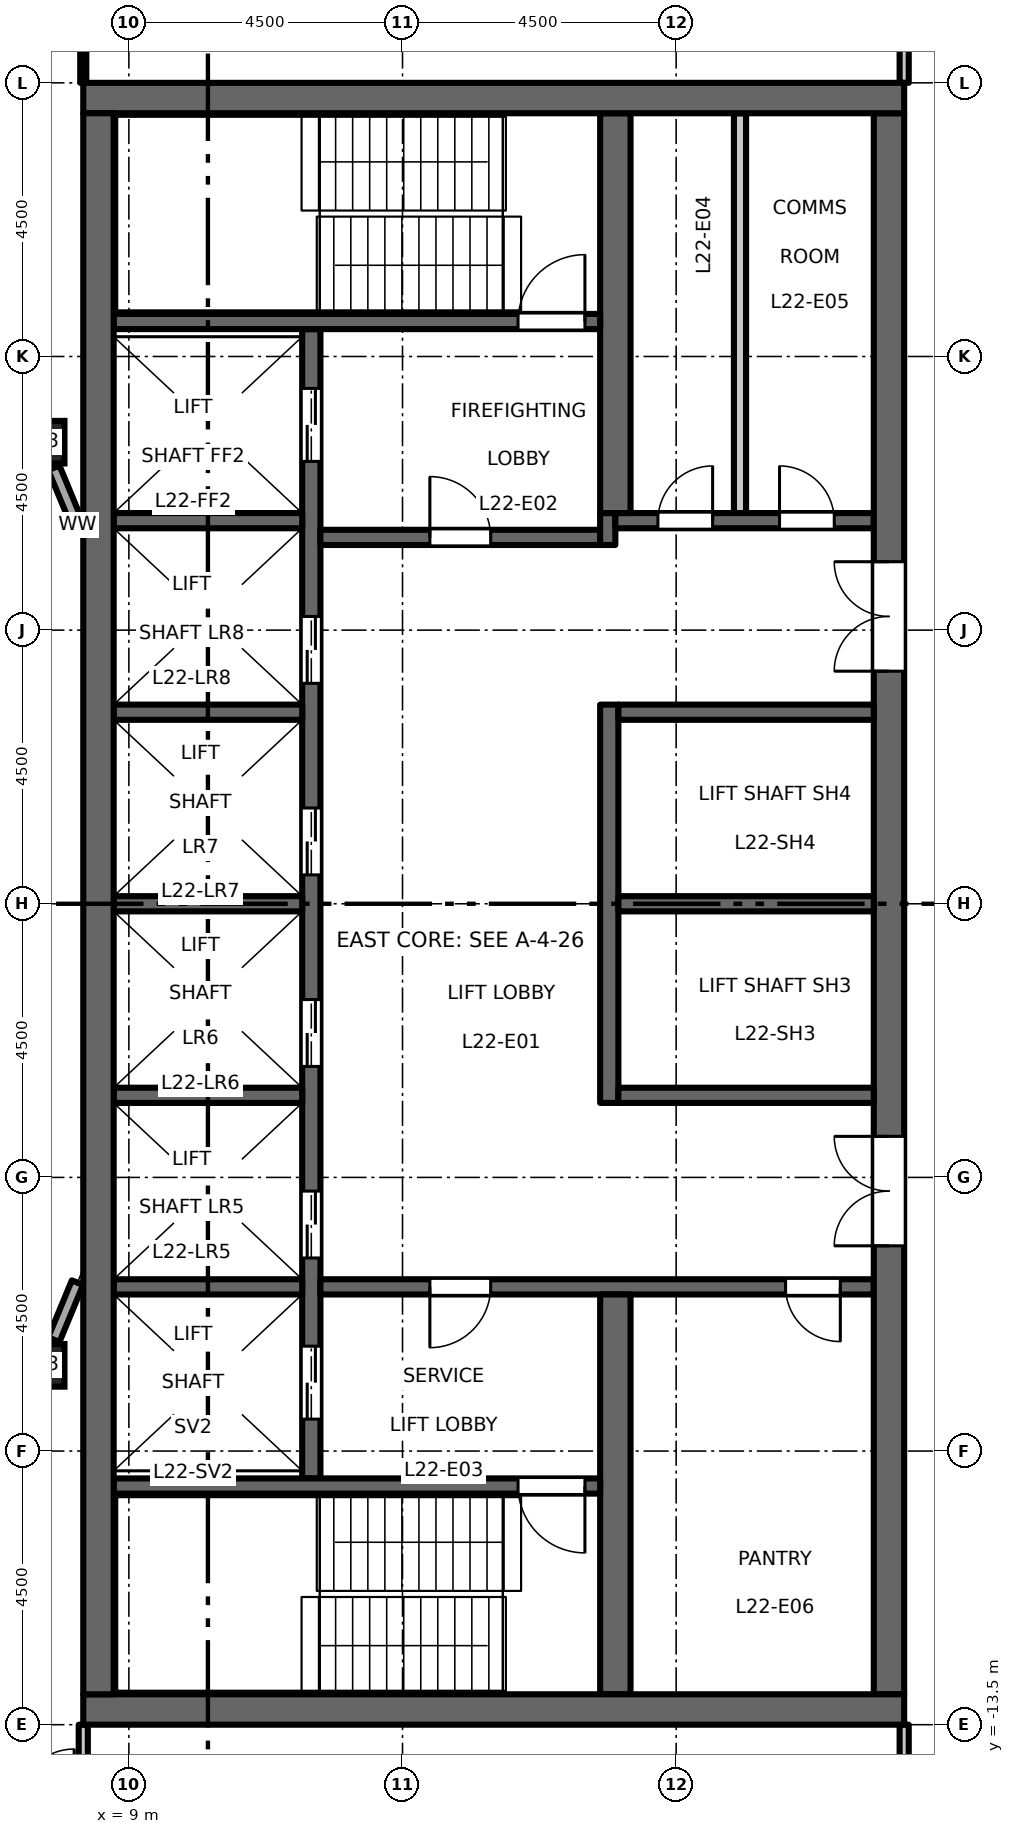
"""IFC4 building model, lengths in metres.
Left out: names, types, materials, properties, quantities, classifications, styles, units other than length and angle.
Written with IfcOpenShell. Run it as: python <this file> out.ifc"""

import sys

from ifc_helpers import new_model, si_unit, direction, frame, frame_2d, origin, origin_2d, place, context, subcontext, project, spatial, rectangle, hollow_rectangle, extrude, element, fill, save


model = new_model("IFC4")
c1 = context("Model", 3, precision=1e-05, world=origin(), true_north=direction((0.0, 1.0)))
c2 = subcontext(c1, "Body", "Model", "MODEL_VIEW")
j1 = project(units=[si_unit("LENGTHUNIT", "METRE"), si_unit("PLANEANGLEUNIT", "RADIAN")], contexts=[c1])
p1 = place(None, origin())
s1 = spatial("IfcSite", under=j1, at=p1, CompositionType="ELEMENT")
p2 = place(p1, origin())
s2 = spatial("IfcBuilding", under=s1, at=p2, CompositionType="ELEMENT")
p3 = place(p2, frame((0.0, 0.0, 104.7)))
s3 = spatial("IfcBuildingStorey", under=s2, at=p3, CompositionType="ELEMENT", Elevation=104.7)
for number, where, z_axis, x_axis in (
    (1, (7.591, -7.591, 0.0), (0.0, 0.0, 1.0), (1.0, 0.0, 0.0)),
    (2, (7.591, 7.591, 0.0), (0.0, 0.0, 1.0), (1.0, 0.0, 0.0)),
):
    element("IfcColumn", number, at=place(p3, frame(where, z_axis=z_axis, x_axis=x_axis)), inside=s3, PredefinedType="COLUMN", context=c2, shape_type="SweptSolid", body=[
        extrude(hollow_rectangle(XDim=0.7, YDim=0.7, WallThickness=0.04, at=origin_2d()), origin(), (0.0, 0.0, 1.0), 4.5),
    ])
p4 = place(p3, frame((12.0, -9.45, 0.0), z_axis=(0.0, 0.0, 1.0), x_axis=(0.0, 1.0, 0.0)))
e3 = element("IfcWall", 3, at=p4, inside=s3, PredefinedType="SHEAR", context=c2, shape_type="SweptSolid", body=[
    extrude(rectangle(XDim=18.9, YDim=0.3, at=frame_2d((9.45, 0.0))), origin(), (0.0, 0.0, 1.0), 4.35),
])
p5 = place(p4, frame((3.625, 0.0, 0.0)))
e4 = element("IfcOpeningElement", 4, at=p5, cuts=e3, PredefinedType="OPENING", context=c2, shape_type="SweptSolid", body=[
    extrude(rectangle(XDim=1.1, YDim=2.1, at=frame_2d((0.55, 1.05))), frame((0.0, 0.16, 0.0), z_axis=(0.0, -1.0, 0.0), x_axis=(1.0, 0.0, 0.0)), (0.0, 0.0, 1.0), 0.32),
])
p6 = place(p4, frame((6.775, 0.0, 0.0)))
e5 = element("IfcOpeningElement", 5, at=p6, cuts=e3, PredefinedType="OPENING", context=c2, shape_type="SweptSolid", body=[
    extrude(rectangle(XDim=1.1, YDim=2.1, at=frame_2d((0.55, 1.05))), frame((0.0, 0.16, 0.0), z_axis=(0.0, -1.0, 0.0), x_axis=(1.0, 0.0, 0.0)), (0.0, 0.0, 1.0), 0.32),
])
p7 = place(p4, frame((9.925, 0.0, 0.0)))
e6 = element("IfcOpeningElement", 6, at=p7, cuts=e3, PredefinedType="OPENING", context=c2, shape_type="SweptSolid", body=[
    extrude(rectangle(XDim=1.1, YDim=2.1, at=frame_2d((0.55, 1.05))), frame((0.0, 0.16, 0.0), z_axis=(0.0, -1.0, 0.0), x_axis=(1.0, 0.0, 0.0)), (0.0, 0.0, 1.0), 0.32),
])
p8 = place(p4, frame((13.075, 0.0, 0.0)))
e7 = element("IfcOpeningElement", 7, at=p8, cuts=e3, PredefinedType="OPENING", context=c2, shape_type="SweptSolid", body=[
    extrude(rectangle(XDim=1.1, YDim=2.1, at=frame_2d((0.55, 1.05))), frame((0.0, 0.16, 0.0), z_axis=(0.0, -1.0, 0.0), x_axis=(1.0, 0.0, 0.0)), (0.0, 0.0, 1.0), 0.32),
])
p9 = place(p4, frame((16.725, 0.0, 0.0)))
e8 = element("IfcOpeningElement", 8, at=p9, cuts=e3, PredefinedType="OPENING", context=c2, shape_type="SweptSolid", body=[
    extrude(rectangle(XDim=1.2, YDim=2.1, at=frame_2d((0.6, 1.05))), frame((0.0, 0.16, 0.0), z_axis=(0.0, -1.0, 0.0), x_axis=(1.0, 0.0, 0.0)), (0.0, 0.0, 1.0), 0.32),
])
p10 = place(p4, frame((0.975, 0.0, 0.0)))
e9 = element("IfcOpeningElement", 9, at=p10, cuts=e3, PredefinedType="OPENING", context=c2, shape_type="SweptSolid", body=[
    extrude(rectangle(XDim=1.2, YDim=2.1, at=frame_2d((0.6, 1.05))), frame((0.0, 0.16, 0.0), z_axis=(0.0, -1.0, 0.0), x_axis=(1.0, 0.0, 0.0)), (0.0, 0.0, 1.0), 0.32),
])
p11 = place(p3, frame((12.15, 6.025, 0.0), z_axis=(0.0, 0.0, 1.0), x_axis=(1.0, 0.0, 0.0)))
e10 = element("IfcWall", 10, at=p11, inside=s3, PredefinedType="SHEAR", context=c2, shape_type="SweptSolid", body=[
    extrude(rectangle(XDim=4.6, YDim=0.25, at=frame_2d((2.3, 0.0))), origin(), (0.0, 0.0, 1.0), 4.35),
])
p12 = place(p11, frame((1.8, 0.0, 0.0)))
e11 = element("IfcOpeningElement", 11, at=p12, cuts=e10, PredefinedType="OPENING", context=c2, shape_type="SweptSolid", body=[
    extrude(rectangle(XDim=1.0, YDim=2.1, at=frame_2d((0.5, 1.05))), frame((0.0, 0.135, 0.0), z_axis=(0.0, -1.0, 0.0), x_axis=(1.0, 0.0, 0.0)), (0.0, 0.0, 1.0), 0.27),
])
p13 = place(p3, frame((16.875, 5.9, 0.0), z_axis=(0.0, 0.0, 1.0), x_axis=(0.0, 1.0, 0.0)))
e12 = element("IfcWall", 12, at=p13, inside=s3, PredefinedType="SHEAR", context=c2, shape_type="SweptSolid", body=[
    extrude(rectangle(XDim=0.525, YDim=0.25, at=frame_2d((0.263, 0.0))), origin(), (0.0, 0.0, 1.0), 4.35),
])
p14 = place(p3, frame((17.0, 6.3, 0.0), z_axis=(0.0, 0.0, 1.0), x_axis=(1.0, 0.0, 0.0)))
e13 = element("IfcWall", 13, at=p14, inside=s3, PredefinedType="SHEAR", context=c2, shape_type="SweptSolid", body=[
    extrude(rectangle(XDim=4.25, YDim=0.25, at=frame_2d((2.125, 0.0))), origin(), (0.0, 0.0, 1.0), 4.35),
])
p15 = place(p14, frame((0.7, 0.0, 0.0)))
e14 = element("IfcOpeningElement", 14, at=p15, cuts=e13, PredefinedType="OPENING", context=c2, shape_type="SweptSolid", body=[
    extrude(rectangle(XDim=0.9, YDim=2.1, at=frame_2d((0.45, 1.05))), frame((0.0, 0.135, 0.0), z_axis=(0.0, -1.0, 0.0), x_axis=(1.0, 0.0, 0.0)), (0.0, 0.0, 1.0), 0.27),
])
p16 = place(p14, frame((2.7, 0.0, 0.0)))
e15 = element("IfcOpeningElement", 15, at=p16, cuts=e13, PredefinedType="OPENING", context=c2, shape_type="SweptSolid", body=[
    extrude(rectangle(XDim=0.9, YDim=2.1, at=frame_2d((0.45, 1.05))), frame((0.0, 0.135, 0.0), z_axis=(0.0, -1.0, 0.0), x_axis=(1.0, 0.0, 0.0)), (0.0, 0.0, 1.0), 0.27),
])
p17 = place(p3, frame((12.15, -6.3, 0.0), z_axis=(0.0, 0.0, 1.0), x_axis=(1.0, 0.0, 0.0)))
e16 = element("IfcWall", 16, at=p17, inside=s3, PredefinedType="SHEAR", context=c2, shape_type="SweptSolid", body=[
    extrude(rectangle(XDim=9.1, YDim=0.25, at=frame_2d((4.55, 0.0))), origin(), (0.0, 0.0, 1.0), 4.35),
])
p18 = place(p17, frame((1.8, 0.0, 0.0)))
e17 = element("IfcOpeningElement", 17, at=p18, cuts=e16, PredefinedType="OPENING", context=c2, shape_type="SweptSolid", body=[
    extrude(rectangle(XDim=1.0, YDim=2.1, at=frame_2d((0.5, 1.05))), frame((0.0, 0.135, 0.0), z_axis=(0.0, -1.0, 0.0), x_axis=(1.0, 0.0, 0.0)), (0.0, 0.0, 1.0), 0.27),
])
p19 = place(p17, frame((7.65, 0.0, 0.0)))
e18 = element("IfcOpeningElement", 18, at=p19, cuts=e16, PredefinedType="OPENING", context=c2, shape_type="SweptSolid", body=[
    extrude(rectangle(XDim=0.9, YDim=2.1, at=frame_2d((0.45, 1.05))), frame((0.0, 0.135, 0.0), z_axis=(0.0, -1.0, 0.0), x_axis=(1.0, 0.0, 0.0)), (0.0, 0.0, 1.0), 0.27),
])
p20 = place(p3, frame((21.5, -13.0, 0.0), z_axis=(0.0, 0.0, 1.0), x_axis=(0.0, 1.0, 0.0)))
e19 = element("IfcWall", 19, at=p20, inside=s3, PredefinedType="SHEAR", context=c2, shape_type="SweptSolid", body=[
    extrude(rectangle(XDim=26.0, YDim=0.5, at=frame_2d((13.0, 0.0))), origin(), (0.0, 0.0, 1.0), 4.35),
])
p21 = place(p20, frame((16.825, 0.0, 0.0)))
e20 = element("IfcOpeningElement", 20, at=p21, cuts=e19, PredefinedType="OPENING", context=c2, shape_type="SweptSolid", body=[
    extrude(rectangle(XDim=1.8, YDim=2.1, at=frame_2d((0.9, 1.05))), frame((0.0, 0.26, 0.0), z_axis=(0.0, -1.0, 0.0), x_axis=(1.0, 0.0, 0.0)), (0.0, 0.0, 1.0), 0.52),
])
p22 = place(p20, frame((7.375, 0.0, 0.0)))
e21 = element("IfcOpeningElement", 21, at=p22, cuts=e19, PredefinedType="OPENING", context=c2, shape_type="SweptSolid", body=[
    extrude(rectangle(XDim=1.8, YDim=2.1, at=frame_2d((0.9, 1.05))), frame((0.0, 0.26, 0.0), z_axis=(0.0, -1.0, 0.0), x_axis=(1.0, 0.0, 0.0)), (0.0, 0.0, 1.0), 0.52),
])
p23 = place(p3, frame((19.05, 6.425, 0.0), z_axis=(0.0, 0.0, 1.0), x_axis=(0.0, 1.0, 0.0)))
e22 = element("IfcWall", 22, at=p23, inside=s3, PredefinedType="PARTITIONING", context=c2, shape_type="SweptSolid", body=[
    extrude(rectangle(XDim=6.575, YDim=0.2, at=frame_2d((3.288, 0.0))), origin(), (0.0, 0.0, 1.0), 4.35),
])
p24 = place(p3, frame((16.9, -3.275, 0.0), z_axis=(0.0, 0.0, 1.0), x_axis=(0.0, 1.0, 0.0)))
e23 = element("IfcWall", 23, at=p24, inside=s3, PredefinedType="SHEAR", context=c2, shape_type="SweptSolid", body=[
    extrude(rectangle(XDim=6.55, YDim=0.3, at=frame_2d((3.275, 0.0))), origin(), (0.0, 0.0, 1.0), 4.35),
])
for number, where, z_axis, x_axis in (
    (24, (17.05, 0.0, 0.0), (0.0, 0.0, 1.0), (1.0, 0.0, 0.0)),
    (25, (17.05, 3.15, 0.0), (0.0, 0.0, 1.0), (1.0, 0.0, 0.0)),
    (26, (17.05, -3.15, 0.0), (0.0, 0.0, 1.0), (1.0, 0.0, 0.0)),
):
    element("IfcWall", number, at=place(p3, frame(where, z_axis=z_axis, x_axis=x_axis)), inside=s3, PredefinedType="SHEAR", context=c2, shape_type="SweptSolid", body=[
        extrude(rectangle(XDim=4.2, YDim=0.25, at=frame_2d((2.1, 0.0))), origin(), (0.0, 0.0, 1.0), 4.35),
    ])
for number, where, z_axis, x_axis in (
    (27, (17.0, 6.425, 0.0), (0.0, 0.0, 1.0), (0.0, 1.0, 0.0)),
    (28, (17.0, -13.0, 0.0), (0.0, 0.0, 1.0), (0.0, 1.0, 0.0)),
):
    element("IfcWall", number, at=place(p3, frame(where, z_axis=z_axis, x_axis=x_axis)), inside=s3, PredefinedType="SHEAR", context=c2, shape_type="SweptSolid", body=[
        extrude(rectangle(XDim=6.575, YDim=0.5, at=frame_2d((3.288, 0.0))), origin(), (0.0, 0.0, 1.0), 4.35),
    ])
for number, where, z_axis, x_axis in (
    (29, (8.75, 0.0, 0.0), (0.0, 0.0, 1.0), (1.0, 0.0, 0.0)),
    (30, (8.75, 3.15, 0.0), (0.0, 0.0, 1.0), (1.0, 0.0, 0.0)),
    (31, (8.75, 6.3, 0.0), (0.0, 0.0, 1.0), (1.0, 0.0, 0.0)),
    (32, (8.75, -3.15, 0.0), (0.0, 0.0, 1.0), (1.0, 0.0, 0.0)),
    (33, (8.75, -6.3, 0.0), (0.0, 0.0, 1.0), (1.0, 0.0, 0.0)),
):
    element("IfcWall", number, at=place(p3, frame(where, z_axis=z_axis, x_axis=x_axis)), inside=s3, PredefinedType="SHEAR", context=c2, shape_type="SweptSolid", body=[
        extrude(rectangle(XDim=3.1, YDim=0.25, at=frame_2d((1.55, 0.0))), origin(), (0.0, 0.0, 1.0), 4.35),
    ])
p25 = place(p3, frame((8.75, 9.575, 0.0), z_axis=(0.0, 0.0, 1.0), x_axis=(1.0, 0.0, 0.0)))
e34 = element("IfcWall", 34, at=p25, inside=s3, PredefinedType="SHEAR", context=c2, shape_type="SweptSolid", body=[
    extrude(rectangle(XDim=8.0, YDim=0.25, at=frame_2d((4.0, 0.0))), origin(), (0.0, 0.0, 1.0), 4.35),
])
p26 = place(p25, frame((6.65, 0.0, 0.0)))
e35 = element("IfcOpeningElement", 35, at=p26, cuts=e34, PredefinedType="OPENING", context=c2, shape_type="SweptSolid", body=[
    extrude(rectangle(XDim=1.1, YDim=2.1, at=frame_2d((0.55, 1.05))), frame((0.0, 0.135, 0.0), z_axis=(0.0, -1.0, 0.0), x_axis=(1.0, 0.0, 0.0)), (0.0, 0.0, 1.0), 0.27),
])
p27 = place(p3, frame((8.75, -9.575, 0.0), z_axis=(0.0, 0.0, 1.0), x_axis=(1.0, 0.0, 0.0)))
e36 = element("IfcWall", 36, at=p27, inside=s3, PredefinedType="SHEAR", context=c2, shape_type="SweptSolid", body=[
    extrude(rectangle(XDim=8.0, YDim=0.25, at=frame_2d((4.0, 0.0))), origin(), (0.0, 0.0, 1.0), 4.35),
])
p28 = place(p27, frame((6.65, 0.0, 0.0)))
e37 = element("IfcOpeningElement", 37, at=p28, cuts=e36, PredefinedType="OPENING", context=c2, shape_type="SweptSolid", body=[
    extrude(rectangle(XDim=1.1, YDim=2.1, at=frame_2d((0.55, 1.05))), frame((0.0, 0.135, 0.0), z_axis=(0.0, -1.0, 0.0), x_axis=(1.0, 0.0, 0.0)), (0.0, 0.0, 1.0), 0.27),
])
for number, where, z_axis, x_axis in (
    (38, (8.25, 13.25, 0.0), (0.0, 0.0, 1.0), (1.0, 0.0, 0.0)),
    (39, (8.25, -13.25, 0.0), (0.0, 0.0, 1.0), (1.0, 0.0, 0.0)),
):
    element("IfcWall", number, at=place(p3, frame(where, z_axis=z_axis, x_axis=x_axis)), inside=s3, PredefinedType="SHEAR", context=c2, shape_type="SweptSolid", body=[
        extrude(rectangle(XDim=13.5, YDim=0.5, at=frame_2d((6.75, 0.0))), origin(), (0.0, 0.0, 1.0), 4.35),
    ])
p29 = place(p3, frame((8.5, -13.0, 0.0), z_axis=(0.0, 0.0, 1.0), x_axis=(0.0, 1.0, 0.0)))
e40 = element("IfcWall", 40, at=p29, inside=s3, PredefinedType="SHEAR", context=c2, shape_type="SweptSolid", body=[
    extrude(rectangle(XDim=26.0, YDim=0.5, at=frame_2d((13.0, 0.0))), origin(), (0.0, 0.0, 1.0), 4.35),
])
for number, where, z_axis, x_axis in (
    (41, (7.766, -7.168, 0.0), (0.0, 0.0, 1.0), (0.383, 0.924, 0.0)),
    (42, (8.154, 6.231, 0.0), (0.0, 0.0, 1.0), (-0.383, 0.924, 0.0)),
):
    element("IfcWall", number, at=place(p3, frame(where, z_axis=z_axis, x_axis=x_axis)), inside=s3, PredefinedType="STANDARD", context=c2, shape_type="SweptSolid", body=[
        extrude(rectangle(XDim=1.015, YDim=0.2, at=frame_2d((0.507, 0.0))), origin(), (0.0, 0.0, 1.0), 3.826),
    ])
p30 = place(p3, frame((8.25, 13.5, 0.0), z_axis=(0.0, 0.0, 1.0), x_axis=(0.0, 1.0, 0.0)))
e43 = element("IfcWall", 43, at=p30, inside=s3, PredefinedType="PARTITIONING", context=c2, shape_type="SweptSolid", body=[
    extrude(rectangle(XDim=3.425, YDim=0.1, at=frame_2d((1.712, 0.0))), origin(), (0.0, 0.0, 1.0), 4.35),
])
p31 = place(p3, frame((8.25, -14.8, 0.0), z_axis=(0.0, 0.0, 1.0), x_axis=(0.0, 1.0, 0.0)))
e44 = element("IfcWall", 44, at=p31, inside=s3, PredefinedType="PARTITIONING", context=c2, shape_type="SweptSolid", body=[
    extrude(rectangle(XDim=1.3, YDim=0.15, at=frame_2d((0.65, 0.0))), origin(), (0.0, 0.0, 1.0), 4.35),
])
for number, where, z_axis, x_axis in (
    (45, (21.75, -16.925, 0.0), (0.0, 0.0, 1.0), (0.0, 1.0, 0.0)),
    (46, (21.75, 13.5, 0.0), (0.0, 0.0, 1.0), (0.0, 1.0, 0.0)),
):
    element("IfcWall", number, at=place(p3, frame(where, z_axis=z_axis, x_axis=x_axis)), inside=s3, PredefinedType="PARTITIONING", context=c2, shape_type="SweptSolid", body=[
        extrude(rectangle(XDim=3.425, YDim=0.15, at=frame_2d((1.712, 0.0))), origin(), (0.0, 0.0, 1.0), 4.35),
    ])
p32 = place(p12, origin())
e47 = element("IfcDoor", 47, at=p32, inside=s3, OperationType="SINGLE_SWING_RIGHT", PredefinedType="DOOR", context=c2, shape_type="SweptSolid", body=[
    extrude(rectangle(XDim=1.0, YDim=2.1, at=frame_2d((0.5, 1.05))), frame((0.0, 0.025, 0.0), z_axis=(0.0, -1.0, 0.0), x_axis=(1.0, 0.0, 0.0)), (0.0, 0.0, 1.0), 0.05),
])
fill(e11, e47)
p33 = place(p18, origin())
e48 = element("IfcDoor", 48, at=p33, inside=s3, OperationType="SINGLE_SWING_LEFT", PredefinedType="DOOR", context=c2, shape_type="SweptSolid", body=[
    extrude(rectangle(XDim=1.0, YDim=2.1, at=frame_2d((0.5, 1.05))), frame((0.0, 0.025, 0.0), z_axis=(0.0, -1.0, 0.0), x_axis=(1.0, 0.0, 0.0)), (0.0, 0.0, 1.0), 0.05),
])
fill(e17, e48)
p34 = place(p26, origin())
e49 = element("IfcDoor", 49, at=p34, inside=s3, OperationType="SINGLE_SWING_LEFT", PredefinedType="DOOR", context=c2, shape_type="SweptSolid", body=[
    extrude(rectangle(XDim=1.1, YDim=2.1, at=frame_2d((0.55, 1.05))), frame((0.0, 0.025, 0.0), z_axis=(0.0, -1.0, 0.0), x_axis=(1.0, 0.0, 0.0)), (0.0, 0.0, 1.0), 0.05),
])
fill(e35, e49)
p35 = place(p28, origin())
e50 = element("IfcDoor", 50, at=p35, inside=s3, OperationType="SINGLE_SWING_RIGHT", PredefinedType="DOOR", context=c2, shape_type="SweptSolid", body=[
    extrude(rectangle(XDim=1.1, YDim=2.1, at=frame_2d((0.55, 1.05))), frame((0.0, 0.025, 0.0), z_axis=(0.0, -1.0, 0.0), x_axis=(1.0, 0.0, 0.0)), (0.0, 0.0, 1.0), 0.05),
])
fill(e37, e50)
p36 = place(p21, origin())
e51 = element("IfcDoor", 51, at=p36, inside=s3, OperationType="DOUBLE_DOOR_DOUBLE_SWING", PredefinedType="DOOR", context=c2, shape_type="SweptSolid", body=[
    extrude(rectangle(XDim=1.8, YDim=2.1, at=frame_2d((0.9, 1.05))), frame((0.0, 0.025, 0.0), z_axis=(0.0, -1.0, 0.0), x_axis=(1.0, 0.0, 0.0)), (0.0, 0.0, 1.0), 0.05),
])
fill(e20, e51)
p37 = place(p22, origin())
e52 = element("IfcDoor", 52, at=p37, inside=s3, OperationType="DOUBLE_DOOR_DOUBLE_SWING", PredefinedType="DOOR", context=c2, shape_type="SweptSolid", body=[
    extrude(rectangle(XDim=1.8, YDim=2.1, at=frame_2d((0.9, 1.05))), frame((0.0, 0.025, 0.0), z_axis=(0.0, -1.0, 0.0), x_axis=(1.0, 0.0, 0.0)), (0.0, 0.0, 1.0), 0.05),
])
fill(e21, e52)
p38 = place(p5, origin())
e53 = element("IfcDoor", 53, at=p38, inside=s3, OperationType="DOUBLE_DOOR_SLIDING", PredefinedType="DOOR", context=c2, shape_type="SweptSolid", body=[
    extrude(rectangle(XDim=1.1, YDim=2.1, at=frame_2d((0.55, 1.05))), frame((0.0, 0.025, 0.0), z_axis=(0.0, -1.0, 0.0), x_axis=(1.0, 0.0, 0.0)), (0.0, 0.0, 1.0), 0.05),
])
fill(e4, e53)
p39 = place(p6, origin())
e54 = element("IfcDoor", 54, at=p39, inside=s3, OperationType="DOUBLE_DOOR_SLIDING", PredefinedType="DOOR", context=c2, shape_type="SweptSolid", body=[
    extrude(rectangle(XDim=1.1, YDim=2.1, at=frame_2d((0.55, 1.05))), frame((0.0, 0.025, 0.0), z_axis=(0.0, -1.0, 0.0), x_axis=(1.0, 0.0, 0.0)), (0.0, 0.0, 1.0), 0.05),
])
fill(e5, e54)
p40 = place(p7, origin())
e55 = element("IfcDoor", 55, at=p40, inside=s3, OperationType="DOUBLE_DOOR_SLIDING", PredefinedType="DOOR", context=c2, shape_type="SweptSolid", body=[
    extrude(rectangle(XDim=1.1, YDim=2.1, at=frame_2d((0.55, 1.05))), frame((0.0, 0.025, 0.0), z_axis=(0.0, -1.0, 0.0), x_axis=(1.0, 0.0, 0.0)), (0.0, 0.0, 1.0), 0.05),
])
fill(e6, e55)
p41 = place(p8, origin())
e56 = element("IfcDoor", 56, at=p41, inside=s3, OperationType="DOUBLE_DOOR_SLIDING", PredefinedType="DOOR", context=c2, shape_type="SweptSolid", body=[
    extrude(rectangle(XDim=1.1, YDim=2.1, at=frame_2d((0.55, 1.05))), frame((0.0, 0.025, 0.0), z_axis=(0.0, -1.0, 0.0), x_axis=(1.0, 0.0, 0.0)), (0.0, 0.0, 1.0), 0.05),
])
fill(e7, e56)
p42 = place(p9, origin())
e57 = element("IfcDoor", 57, at=p42, inside=s3, OperationType="DOUBLE_DOOR_SLIDING", PredefinedType="DOOR", context=c2, shape_type="SweptSolid", body=[
    extrude(rectangle(XDim=1.2, YDim=2.1, at=frame_2d((0.6, 1.05))), frame((0.0, 0.025, 0.0), z_axis=(0.0, -1.0, 0.0), x_axis=(1.0, 0.0, 0.0)), (0.0, 0.0, 1.0), 0.05),
])
fill(e8, e57)
p43 = place(p10, origin())
e58 = element("IfcDoor", 58, at=p43, inside=s3, OperationType="DOUBLE_DOOR_SLIDING", PredefinedType="DOOR", context=c2, shape_type="SweptSolid", body=[
    extrude(rectangle(XDim=1.2, YDim=2.1, at=frame_2d((0.6, 1.05))), frame((0.0, 0.025, 0.0), z_axis=(0.0, -1.0, 0.0), x_axis=(1.0, 0.0, 0.0)), (0.0, 0.0, 1.0), 0.05),
])
fill(e9, e58)
p44 = place(p15, origin())
e59 = element("IfcDoor", 59, at=p44, inside=s3, OperationType="SINGLE_SWING_LEFT", PredefinedType="DOOR", context=c2, shape_type="SweptSolid", body=[
    extrude(rectangle(XDim=0.9, YDim=2.1, at=frame_2d((0.45, 1.05))), frame((0.0, 0.025, 0.0), z_axis=(0.0, -1.0, 0.0), x_axis=(1.0, 0.0, 0.0)), (0.0, 0.0, 1.0), 0.05),
])
fill(e14, e59)
p45 = place(p16, origin())
e60 = element("IfcDoor", 60, at=p45, inside=s3, OperationType="SINGLE_SWING_RIGHT", PredefinedType="DOOR", context=c2, shape_type="SweptSolid", body=[
    extrude(rectangle(XDim=0.9, YDim=2.1, at=frame_2d((0.45, 1.05))), frame((0.0, 0.025, 0.0), z_axis=(0.0, -1.0, 0.0), x_axis=(1.0, 0.0, 0.0)), (0.0, 0.0, 1.0), 0.05),
])
fill(e15, e60)
p46 = place(p19, origin())
e61 = element("IfcDoor", 61, at=p46, inside=s3, OperationType="SINGLE_SWING_RIGHT", PredefinedType="DOOR", context=c2, shape_type="SweptSolid", body=[
    extrude(rectangle(XDim=0.9, YDim=2.1, at=frame_2d((0.45, 1.05))), frame((0.0, 0.025, 0.0), z_axis=(0.0, -1.0, 0.0), x_axis=(1.0, 0.0, 0.0)), (0.0, 0.0, 1.0), 0.05),
])
fill(e18, e61)
save(model, sys.argv[1])
